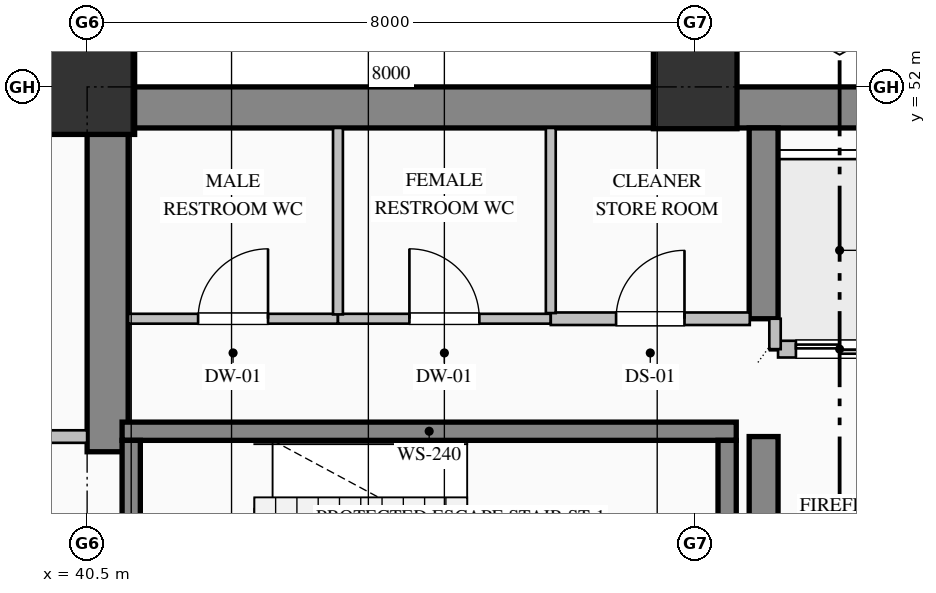
"""IFC4 building model, lengths in metres.
Left out: names, types, materials, properties, quantities, classifications, styles, units other than length and angle.
Written with IfcOpenShell. Run it as: python <this file> out.ifc"""

import sys

from ifc_helpers import new_model, si_unit, direction, frame, frame_2d, origin, origin_2d, place, context, subcontext, project, spatial, rectangle, hollow_rectangle, extrude, element, fill, save


model = new_model("IFC4")
c1 = context("Model", 3, precision=1e-05, world=origin(), true_north=direction((0.0, 1.0)))
c2 = subcontext(c1, "Body", "Model", "MODEL_VIEW")
j1 = project(units=[si_unit("LENGTHUNIT", "METRE"), si_unit("PLANEANGLEUNIT", "RADIAN")], contexts=[c1])
p1 = place(None, origin())
s1 = spatial("IfcSite", under=j1, at=p1, CompositionType="ELEMENT")
p2 = place(p1, origin())
s2 = spatial("IfcBuilding", under=s1, at=p2, CompositionType="ELEMENT")
p3 = place(p2, frame((0.0, 0.0, 40.2)))
s3 = spatial("IfcBuildingStorey", under=s2, at=p3, CompositionType="ELEMENT", Elevation=40.2)
p4 = place(p3, frame((40.5, 51.73, 0.0), z_axis=(0.0, 0.0, 1.0), x_axis=(1.0, 0.0, 0.0)))
e1 = element("IfcWall", 1, at=p4, inside=s3, PredefinedType="SHEAR", context=c2, shape_type="SweptSolid", body=[
    extrude(rectangle(XDim=23.5, YDim=0.54, at=frame_2d((11.75, 0.0))), origin(), (0.0, 0.0, 1.0), 3.75),
])
p5 = place(p3, frame((40.77, 47.2, 0.0), z_axis=(0.0, 0.0, 1.0), x_axis=(0.0, 1.0, 0.0)))
e2 = element("IfcWall", 2, at=p5, inside=s3, PredefinedType="SHEAR", context=c2, shape_type="SweptSolid", body=[
    extrude(rectangle(XDim=4.26, YDim=0.54, at=frame_2d((2.13, 0.0))), origin(), (0.0, 0.0, 1.0), 3.75),
])
p6 = place(p3, frame((49.4, 44.4, 0.0), z_axis=(0.0, 0.0, 1.0), x_axis=(0.0, 1.0, 0.0)))
e3 = element("IfcWall", 3, at=p6, inside=s3, PredefinedType="SHEAR", context=c2, shape_type="SweptSolid", body=[
    extrude(rectangle(XDim=3.0, YDim=0.38, at=frame_2d((1.5, 0.0))), origin(), (0.0, 0.0, 1.0), 3.75),
])
p7 = place(p3, frame((49.4, 48.95, 0.0), z_axis=(0.0, 0.0, 1.0), x_axis=(0.0, 1.0, 0.0)))
e4 = element("IfcWall", 4, at=p7, inside=s3, PredefinedType="SHEAR", context=c2, shape_type="SweptSolid", body=[
    extrude(rectangle(XDim=2.51, YDim=0.38, at=frame_2d((1.255, 0.0))), origin(), (0.0, 0.0, 1.0), 3.75),
])
p8 = place(p3, frame((40.5, 52.0, 0.0), z_axis=(0.0, 0.0, 1.0), x_axis=(1.0, 0.0, 0.0)))
e5 = element("IfcColumn", 5, at=p8, inside=s3, PredefinedType="COLUMN", context=c2, shape_type="SweptSolid", body=[
    extrude(hollow_rectangle(XDim=1.25, YDim=1.25, WallThickness=0.045, at=origin_2d()), origin(), (0.0, 0.0, 1.0), 4.0),
])
p9 = place(p3, frame((48.5, 52.0, 0.0), z_axis=(0.0, 0.0, 1.0), x_axis=(1.0, 0.0, 0.0)))
e6 = element("IfcColumn", 6, at=p9, inside=s3, PredefinedType="COLUMN", context=c2, shape_type="SweptSolid", body=[
    extrude(hollow_rectangle(XDim=1.1, YDim=1.1, WallThickness=0.04, at=origin_2d()), origin(), (0.0, 0.0, 1.0), 4.0),
])
p10 = place(p3, frame((4.0, 51.83, 0.0), z_axis=(0.0, 0.0, 1.0), x_axis=(1.0, 0.0, 0.0)))
e7 = element("IfcWall", 7, at=p10, inside=s3, PredefinedType="SOLIDWALL", context=c2, shape_type="SweptSolid", body=[
    extrude(rectangle(XDim=36.52, YDim=0.34, at=frame_2d((18.26, 0.0))), origin(), (0.0, 0.0, 1.0), 3.25),
])
p11 = place(p10, frame((6.3, 0.0, 0.85)))
e8 = element("IfcOpeningElement", 8, at=p11, cuts=e7, PredefinedType="OPENING", context=c2, shape_type="SweptSolid", body=[
    extrude(rectangle(XDim=1.8, YDim=2.05, at=frame_2d((0.9, 1.025))), frame((0.0, 0.18, 0.0), z_axis=(0.0, -1.0, 0.0), x_axis=(1.0, 0.0, 0.0)), (0.0, 0.0, 1.0), 0.36),
])
p12 = place(p10, frame((17.1, 0.0, 0.85)))
e9 = element("IfcOpeningElement", 9, at=p12, cuts=e7, PredefinedType="OPENING", context=c2, shape_type="SweptSolid", body=[
    extrude(rectangle(XDim=1.8, YDim=2.05, at=frame_2d((0.9, 1.025))), frame((0.0, 0.18, 0.0), z_axis=(0.0, -1.0, 0.0), x_axis=(1.0, 0.0, 0.0)), (0.0, 0.0, 1.0), 0.36),
])
p13 = place(p10, frame((24.0, 0.0, 0.8)))
e10 = element("IfcOpeningElement", 10, at=p13, cuts=e7, PredefinedType="OPENING", context=c2, shape_type="SweptSolid", body=[
    extrude(rectangle(XDim=2.4, YDim=2.15, at=frame_2d((1.2, 1.075))), frame((0.0, 0.18, 0.0), z_axis=(0.0, -1.0, 0.0), x_axis=(1.0, 0.0, 0.0)), (0.0, 0.0, 1.0), 0.36),
])
p14 = place(p3, frame((40.96, 47.47, 0.0), z_axis=(0.0, 0.0, 1.0), x_axis=(1.0, 0.0, 0.0)))
e11 = element("IfcWall", 11, at=p14, inside=s3, PredefinedType="SOLIDWALL", context=c2, shape_type="SweptSolid", body=[
    extrude(rectangle(XDim=8.08, YDim=0.24, at=frame_2d((4.04, 0.0))), origin(), (0.0, 0.0, 1.0), 4.0),
])
p15 = place(p3, frame((41.08, 47.35, 0.0), z_axis=(0.0, 0.0, 1.0), x_axis=(0.0, -1.0, 0.0)))
e12 = element("IfcWall", 12, at=p15, inside=s3, PredefinedType="SOLIDWALL", context=c2, shape_type="SweptSolid", body=[
    extrude(rectangle(XDim=3.15, YDim=0.24, at=frame_2d((1.575, 0.0))), origin(), (0.0, 0.0, 1.0), 4.0),
])
p16 = place(p15, frame((1.0, 0.0, 0.0)))
e13 = element("IfcOpeningElement", 13, at=p16, cuts=e12, PredefinedType="OPENING", context=c2, shape_type="SweptSolid", body=[
    extrude(rectangle(XDim=1.15, YDim=2.2, at=frame_2d((0.575, 1.1))), frame((0.0, 0.13, 0.0), z_axis=(0.0, -1.0, 0.0), x_axis=(1.0, 0.0, 0.0)), (0.0, 0.0, 1.0), 0.26),
])
p17 = place(p3, frame((48.92, 44.2, 0.0), z_axis=(0.0, 0.0, 1.0), x_axis=(0.0, 1.0, 0.0)))
e14 = element("IfcWall", 14, at=p17, inside=s3, PredefinedType="SOLIDWALL", context=c2, shape_type="SweptSolid", body=[
    extrude(rectangle(XDim=3.15, YDim=0.24, at=frame_2d((1.575, 0.0))), origin(), (0.0, 0.0, 1.0), 4.0),
])
p18 = place(p3, frame((54.71, 48.55, 0.0), z_axis=(0.0, 0.0, 1.0), x_axis=(-1.0, 0.0, 0.0)))
e15 = element("IfcWall", 15, at=p18, inside=s3, PredefinedType="PARTITIONING", context=c2, shape_type="SweptSolid", body=[
    extrude(rectangle(XDim=5.12, YDim=0.22, at=frame_2d((2.56, 0.0))), origin(), (0.0, 0.0, 1.0), 3.75),
])
p19 = place(p18, frame((3.735, 0.0, 0.0)))
e16 = element("IfcOpeningElement", 16, at=p19, cuts=e15, PredefinedType="OPENING", context=c2, shape_type="SweptSolid", body=[
    extrude(rectangle(XDim=1.15, YDim=2.2, at=frame_2d((0.575, 1.1))), frame((0.0, 0.12, 0.0), z_axis=(0.0, -1.0, 0.0), x_axis=(1.0, 0.0, 0.0)), (0.0, 0.0, 1.0), 0.24),
])
p20 = place(p18, frame((0.935, 0.0, 0.0)))
e17 = element("IfcOpeningElement", 17, at=p20, cuts=e15, PredefinedType="OPENING", context=c2, shape_type="SweptSolid", body=[
    extrude(rectangle(XDim=1.15, YDim=2.2, at=frame_2d((0.575, 1.1))), frame((0.0, 0.12, 0.0), z_axis=(0.0, -1.0, 0.0), x_axis=(1.0, 0.0, 0.0)), (0.0, 0.0, 1.0), 0.24),
])
p21 = place(p3, frame((49.55, 48.55, 0.0), z_axis=(0.0, 0.0, 1.0), x_axis=(0.0, 1.0, 0.0)))
e18 = element("IfcWall", 18, at=p21, inside=s3, PredefinedType="PARTITIONING", context=c2, shape_type="SweptSolid", body=[
    extrude(rectangle(XDim=0.4, YDim=0.15, at=frame_2d((0.2, 0.0))), origin(), (0.0, 0.0, 1.0), 3.75),
])
p22 = place(p3, frame((37.8, 47.4, 0.0), z_axis=(0.0, 0.0, 1.0), x_axis=(1.0, 0.0, 0.0)))
e19 = element("IfcWall", 19, at=p22, inside=s3, PredefinedType="PARTITIONING", context=c2, shape_type="SweptSolid", body=[
    extrude(rectangle(XDim=2.7, YDim=0.165, at=frame_2d((1.35, 0.0))), origin(), (0.0, 0.0, 1.0), 3.75),
])
p23 = place(p22, frame((0.825, 0.0, 0.0)))
e20 = element("IfcOpeningElement", 20, at=p23, cuts=e19, PredefinedType="OPENING", context=c2, shape_type="SweptSolid", body=[
    extrude(rectangle(XDim=1.05, YDim=2.15, at=frame_2d((0.525, 1.075))), frame((0.0, 0.093, 0.0), z_axis=(0.0, -1.0, 0.0), x_axis=(1.0, 0.0, 0.0)), (0.0, 0.0, 1.0), 0.185),
])
p24 = place(p3, frame((41.04, 48.95, 0.0), z_axis=(0.0, 0.0, 1.0), x_axis=(1.0, 0.0, 0.0)))
e21 = element("IfcWall", 21, at=p24, inside=s3, PredefinedType="PARTITIONING", context=c2, shape_type="SweptSolid", body=[
    extrude(rectangle(XDim=2.76, YDim=0.13, at=frame_2d((1.38, 0.0))), origin(), (0.0, 0.0, 1.0), 3.75),
])
p25 = place(p24, frame((0.92, 0.0, 0.0)))
e22 = element("IfcOpeningElement", 22, at=p25, cuts=e21, PredefinedType="OPENING", context=c2, shape_type="SweptSolid", body=[
    extrude(rectangle(XDim=0.92, YDim=2.15, at=frame_2d((0.46, 1.075))), frame((0.0, 0.075, 0.0), z_axis=(0.0, -1.0, 0.0), x_axis=(1.0, 0.0, 0.0)), (0.0, 0.0, 1.0), 0.15),
])
p26 = place(p3, frame((43.8, 48.95, 0.0), z_axis=(0.0, 0.0, 1.0), x_axis=(1.0, 0.0, 0.0)))
e23 = element("IfcWall", 23, at=p26, inside=s3, PredefinedType="PARTITIONING", context=c2, shape_type="SweptSolid", body=[
    extrude(rectangle(XDim=2.8, YDim=0.13, at=frame_2d((1.4, 0.0))), origin(), (0.0, 0.0, 1.0), 3.75),
])
p27 = place(p26, frame((0.94, 0.0, 0.0)))
e24 = element("IfcOpeningElement", 24, at=p27, cuts=e23, PredefinedType="OPENING", context=c2, shape_type="SweptSolid", body=[
    extrude(rectangle(XDim=0.92, YDim=2.15, at=frame_2d((0.46, 1.075))), frame((0.0, 0.075, 0.0), z_axis=(0.0, -1.0, 0.0), x_axis=(1.0, 0.0, 0.0)), (0.0, 0.0, 1.0), 0.15),
])
p28 = place(p3, frame((46.6, 48.95, 0.0), z_axis=(0.0, 0.0, 1.0), x_axis=(1.0, 0.0, 0.0)))
e25 = element("IfcWall", 25, at=p28, inside=s3, PredefinedType="PARTITIONING", context=c2, shape_type="SweptSolid", body=[
    extrude(rectangle(XDim=2.618, YDim=0.165, at=frame_2d((1.309, 0.0))), origin(), (0.0, 0.0, 1.0), 3.75),
])
p29 = place(p28, frame((0.859, 0.0, 0.0)))
e26 = element("IfcOpeningElement", 26, at=p29, cuts=e25, PredefinedType="OPENING", context=c2, shape_type="SweptSolid", body=[
    extrude(rectangle(XDim=0.9, YDim=2.15, at=frame_2d((0.45, 1.075))), frame((0.0, 0.093, 0.0), z_axis=(0.0, -1.0, 0.0), x_axis=(1.0, 0.0, 0.0)), (0.0, 0.0, 1.0), 0.185),
])
p30 = place(p3, frame((43.8, 51.46, 0.0), z_axis=(0.0, 0.0, 1.0), x_axis=(0.0, -1.0, 0.0)))
e27 = element("IfcWall", 27, at=p30, inside=s3, PredefinedType="PARTITIONING", context=c2, shape_type="SweptSolid", body=[
    extrude(rectangle(XDim=2.453, YDim=0.13, at=frame_2d((1.227, 0.0))), origin(), (0.0, 0.0, 1.0), 3.75),
])
p31 = place(p3, frame((46.6, 51.46, 0.0), z_axis=(0.0, 0.0, 1.0), x_axis=(0.0, -1.0, 0.0)))
e28 = element("IfcWall", 28, at=p31, inside=s3, PredefinedType="PARTITIONING", context=c2, shape_type="SweptSolid", body=[
    extrude(rectangle(XDim=2.436, YDim=0.13, at=frame_2d((1.218, 0.0))), origin(), (0.0, 0.0, 1.0), 3.75),
])
p32 = place(p19, origin())
e29 = element("IfcDoor", 29, at=p32, inside=s3, OperationType="DOUBLE_DOOR_SLIDING", PredefinedType="DOOR", context=c2, shape_type="SweptSolid", body=[
    extrude(rectangle(XDim=1.15, YDim=2.2, at=frame_2d((0.575, 1.1))), frame((0.0, 0.025, 0.0), z_axis=(0.0, -1.0, 0.0), x_axis=(1.0, 0.0, 0.0)), (0.0, 0.0, 1.0), 0.05),
])
fill(e16, e29)
p33 = place(p25, origin())
e30 = element("IfcDoor", 30, at=p33, inside=s3, OperationType="SINGLE_SWING_RIGHT", PredefinedType="DOOR", context=c2, shape_type="SweptSolid", body=[
    extrude(rectangle(XDim=0.92, YDim=2.15, at=frame_2d((0.46, 1.075))), frame((0.0, 0.025, 0.0), z_axis=(0.0, -1.0, 0.0), x_axis=(1.0, 0.0, 0.0)), (0.0, 0.0, 1.0), 0.05),
])
fill(e22, e30)
p34 = place(p27, origin())
e31 = element("IfcDoor", 31, at=p34, inside=s3, OperationType="SINGLE_SWING_LEFT", PredefinedType="DOOR", context=c2, shape_type="SweptSolid", body=[
    extrude(rectangle(XDim=0.92, YDim=2.15, at=frame_2d((0.46, 1.075))), frame((0.0, 0.025, 0.0), z_axis=(0.0, -1.0, 0.0), x_axis=(1.0, 0.0, 0.0)), (0.0, 0.0, 1.0), 0.05),
])
fill(e24, e31)
p35 = place(p29, origin())
e32 = element("IfcDoor", 32, at=p35, inside=s3, OperationType="SINGLE_SWING_RIGHT", PredefinedType="DOOR", context=c2, shape_type="SweptSolid", body=[
    extrude(rectangle(XDim=0.9, YDim=2.15, at=frame_2d((0.45, 1.075))), frame((0.0, 0.025, 0.0), z_axis=(0.0, -1.0, 0.0), x_axis=(1.0, 0.0, 0.0)), (0.0, 0.0, 1.0), 0.05),
])
fill(e26, e32)
save(model, sys.argv[1])
